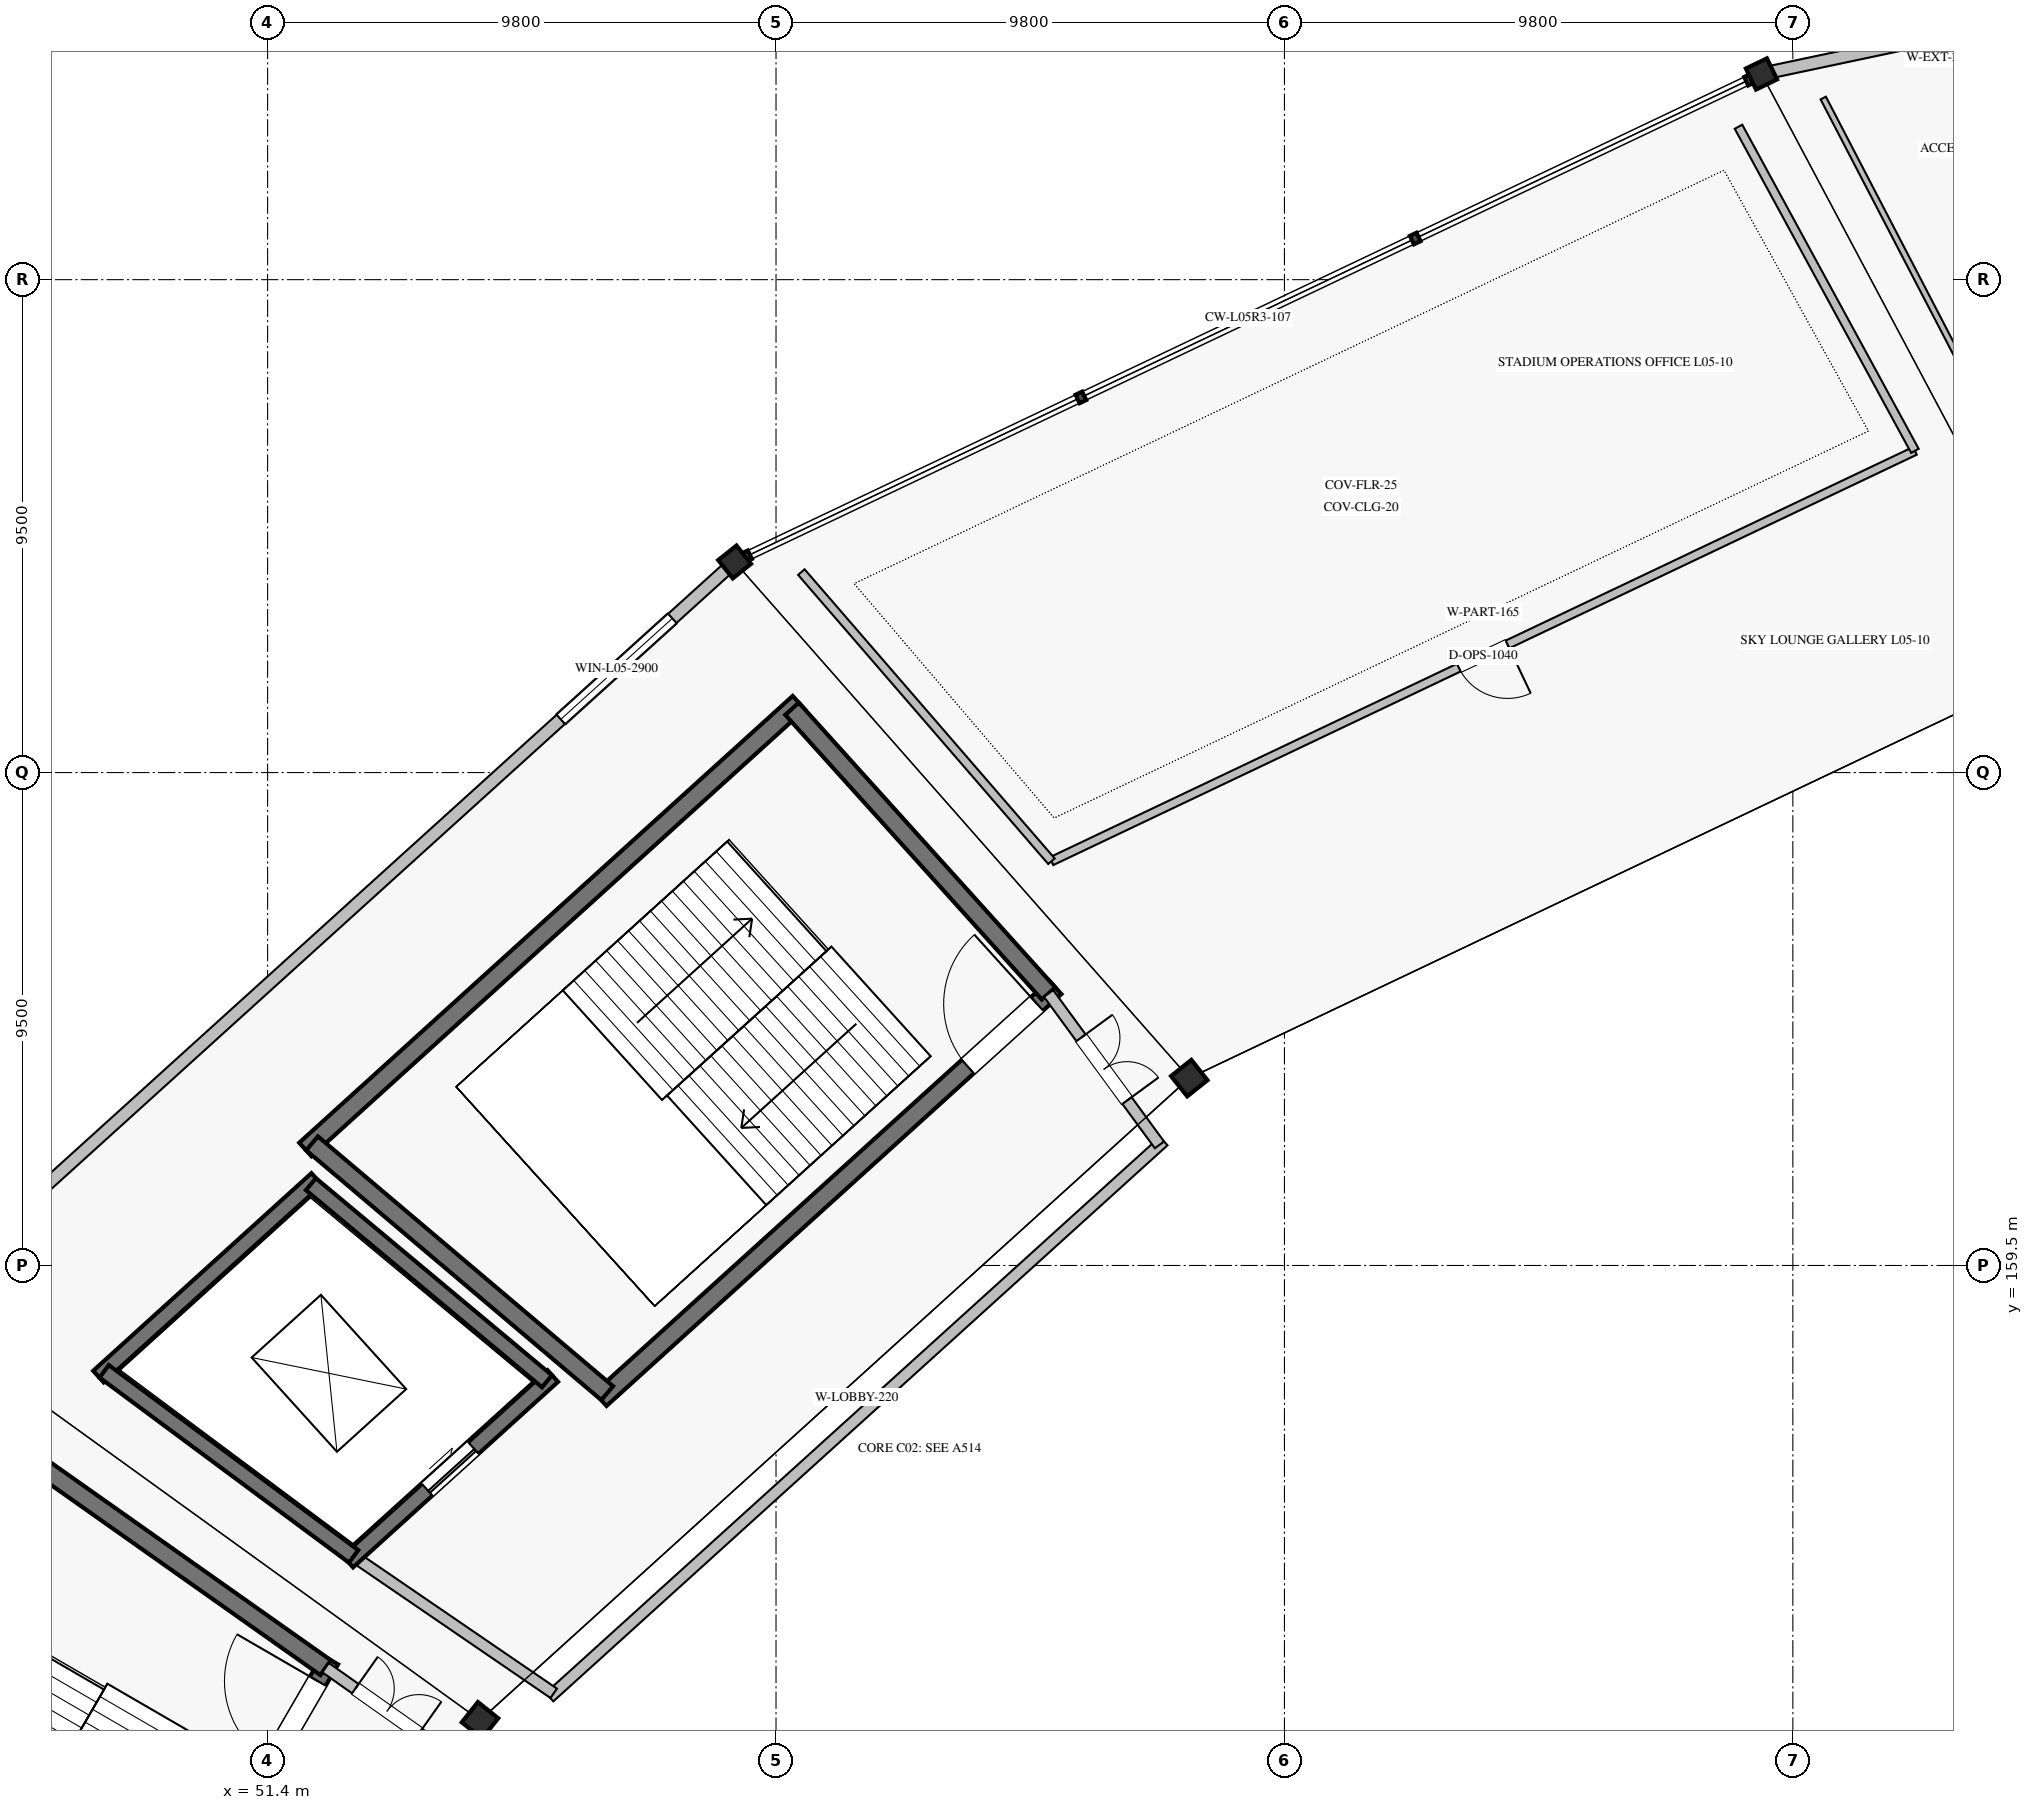
"""IFC4 building model, lengths in metres.
Left out: names, types, materials, properties, quantities, classifications, styles, units other than length and angle.
Written with IfcOpenShell. Run it as: python <this file> out.ifc"""

import sys

from ifc_helpers import new_model, si_unit, direction, frame, frame_2d, origin, origin_2d, place, context, subcontext, project, spatial, rectangle, hollow_rectangle, extrude, element, fill, save


model = new_model("IFC4")
c1 = context("Model", 3, precision=1e-05, world=origin(), true_north=direction((0.0, 1.0)))
c2 = subcontext(c1, "Body", "Model", "MODEL_VIEW")
j1 = project(units=[si_unit("LENGTHUNIT", "METRE"), si_unit("PLANEANGLEUNIT", "RADIAN")], contexts=[c1])
p1 = place(None, origin())
s1 = spatial("IfcSite", under=j1, at=p1, CompositionType="ELEMENT")
p2 = place(p1, origin())
s2 = spatial("IfcBuilding", under=s1, at=p2, CompositionType="ELEMENT")
p3 = place(p2, frame((0.0, 0.0, 25.84)))
s3 = spatial("IfcBuildingStorey", under=s2, at=p3, CompositionType="ELEMENT", Elevation=25.84)
for number, where, z_axis, x_axis in (
    (1, (69.166, 163.111, 0.0), (0.0, 0.0, 1.0), (-0.623, 0.782, 0.0)),
    (2, (55.494, 150.734, 0.0), (0.0, 0.0, 1.0), (-0.782, 0.623, 0.0)),
):
    element("IfcColumn", number, at=place(p3, frame(where, z_axis=z_axis, x_axis=x_axis)), inside=s3, PredefinedType="COLUMN", context=c2, shape_type="SweptSolid", body=[
        extrude(hollow_rectangle(XDim=0.5, YDim=0.5, WallThickness=0.022, at=origin_2d()), origin(), (0.0, 0.0, 1.0), 5.44),
    ])
for number, where, z_axis, x_axis in (
    (3, (80.195, 182.464, 0.0), (0.0, 0.0, 1.0), (-0.434, 0.901, 0.0)),
    (4, (60.402, 173.059, 0.0), (0.0, 0.0, 1.0), (-0.623, 0.782, 0.0)),
):
    element("IfcColumn", number, at=place(p3, frame(where, z_axis=z_axis, x_axis=x_axis)), inside=s3, PredefinedType="COLUMN", context=c2, shape_type="SweptSolid", body=[
        extrude(hollow_rectangle(XDim=0.45, YDim=0.45, WallThickness=0.022, at=origin_2d()), origin(), (0.0, 0.0, 1.0), 5.44),
    ])
p4 = place(p3, frame((101.357, 186.941, 0.0), z_axis=(0.0, 0.0, 1.0), x_axis=(-0.978344108288, -0.206985037572, 0.0)))
e5 = element("IfcWall", 5, at=p4, inside=s3, PredefinedType="SOLIDWALL", context=c2, shape_type="SweptSolid", body=[
    extrude(rectangle(XDim=21.41, YDim=0.24, at=frame_2d((10.705, 0.0))), origin(), (0.0, 0.0, 1.0), 4.53),
])
p5 = place(p4, frame((3.557, 0.0, 1.65)))
e6 = element("IfcOpeningElement", 6, at=p5, cuts=e5, PredefinedType="OPENING", context=c2, shape_type="SweptSolid", body=[
    extrude(rectangle(XDim=1.45, YDim=0.95, at=frame_2d((0.725, 0.475))), frame((0.0, 0.13, 0.0), z_axis=(0.0, -1.0, 0.0), x_axis=(1.0, 0.0, 0.0)), (0.0, 0.0, 1.0), 0.26),
])
p6 = place(p4, frame((10.737, 0.0, 1.65)))
e7 = element("IfcOpeningElement", 7, at=p6, cuts=e5, PredefinedType="OPENING", context=c2, shape_type="SweptSolid", body=[
    extrude(rectangle(XDim=1.65, YDim=1.0, at=frame_2d((0.825, 0.5))), frame((0.0, 0.13, 0.0), z_axis=(0.0, -1.0, 0.0), x_axis=(1.0, 0.0, 0.0)), (0.0, 0.0, 1.0), 0.26),
])
p7 = place(p4, frame((17.385, 0.0, 1.65)))
e8 = element("IfcOpeningElement", 8, at=p7, cuts=e5, PredefinedType="OPENING", context=c2, shape_type="SweptSolid", body=[
    extrude(rectangle(XDim=1.2, YDim=0.9, at=frame_2d((0.6, 0.45))), frame((0.0, 0.13, 0.0), z_axis=(0.0, -1.0, 0.0), x_axis=(1.0, 0.0, 0.0)), (0.0, 0.0, 1.0), 0.26),
])
p8 = place(p3, frame((60.239, 172.911, 0.0), z_axis=(0.0, 0.0, 1.0), x_axis=(-0.741349049196, -0.671119651967, 0.0)))
e9 = element("IfcWall", 9, at=p8, inside=s3, PredefinedType="SOLIDWALL", context=c2, shape_type="SweptSolid", body=[
    extrude(rectangle(XDim=21.004, YDim=0.24, at=frame_2d((10.502, 0.0))), origin(), (0.0, 0.0, 1.0), 4.53),
])
p9 = place(p8, frame((1.4, 0.0, 1.0)))
e10 = element("IfcOpeningElement", 10, at=p9, cuts=e9, PredefinedType="OPENING", context=c2, shape_type="SweptSolid", body=[
    extrude(rectangle(XDim=2.9, YDim=2.05, at=frame_2d((1.45, 1.025))), frame((0.0, 0.13, 0.0), z_axis=(0.0, -1.0, 0.0), x_axis=(1.0, 0.0, 0.0)), (0.0, 0.0, 1.0), 0.26),
])
p10 = place(p3, frame((66.583, 164.86, 0.0), z_axis=(0.0, 0.0, 1.0), x_axis=(-0.741348929385, -0.671119784315, 0.0)))
e11 = element("IfcWall", 11, at=p10, inside=s3, PredefinedType="SHEAR", context=c2, shape_type="SweptSolid", body=[
    extrude(rectangle(XDim=11.826, YDim=0.35, at=frame_2d((5.913, 0.0))), origin(), (0.0, 0.0, 1.0), 5.18),
])
p11 = place(p10, frame((0.475, 0.0, 0.0)))
e12 = element("IfcOpeningElement", 12, at=p11, cuts=e11, PredefinedType="OPENING", context=c2, shape_type="SweptSolid", body=[
    extrude(rectangle(XDim=1.8, YDim=2.2, at=frame_2d((0.9, 1.1))), frame((0.0, 0.185, 0.0), z_axis=(0.0, -1.0, 0.0), x_axis=(1.0, 0.0, 0.0)), (0.0, 0.0, 1.0), 0.37),
])
p12 = place(p3, frame((61.639, 170.347, 0.0), z_axis=(0.0, 0.0, 1.0), x_axis=(-0.741351373721, -0.671117084183, 0.0)))
e13 = element("IfcWall", 13, at=p12, inside=s3, PredefinedType="SHEAR", context=c2, shape_type="SweptSolid", body=[
    extrude(rectangle(XDim=12.83, YDim=0.35, at=frame_2d((6.415, 0.0))), origin(), (0.0, 0.0, 1.0), 5.18),
])
p13 = place(p3, frame((66.454, 164.743, 0.0), z_axis=(0.0, 0.0, 1.0), x_axis=(-0.669463145673, 0.742845270958, 0.0)))
e14 = element("IfcWall", 14, at=p13, inside=s3, PredefinedType="SHEAR", context=c2, shape_type="SweptSolid", body=[
    extrude(rectangle(XDim=7.386, YDim=0.35, at=frame_2d((3.693, 0.0))), origin(), (0.0, 0.0, 1.0), 5.18),
])
p14 = place(p3, frame((57.945, 157.041, 0.0), z_axis=(0.0, 0.0, 1.0), x_axis=(-0.763422324031, 0.64589964791, 0.0)))
e15 = element("IfcWall", 15, at=p14, inside=s3, PredefinedType="SHEAR", context=c2, shape_type="SweptSolid", body=[
    extrude(rectangle(XDim=7.452, YDim=0.35, at=frame_2d((3.726, 0.0))), origin(), (0.0, 0.0, 1.0), 5.18),
])
p15 = place(p3, frame((56.897, 157.369, 0.0), z_axis=(0.0, 0.0, 1.0), x_axis=(-0.741350155641, -0.671118429736, 0.0)))
e16 = element("IfcWall", 16, at=p15, inside=s3, PredefinedType="SHEAR", context=c2, shape_type="SweptSolid", body=[
    extrude(rectangle(XDim=5.329, YDim=0.3, at=frame_2d((2.665, 0.0))), origin(), (0.0, 0.0, 1.0), 5.18),
])
p16 = place(p15, frame((2.065, 0.0, 0.0)))
e17 = element("IfcOpeningElement", 17, at=p16, cuts=e16, PredefinedType="OPENING", context=c2, shape_type="SweptSolid", body=[
    extrude(rectangle(XDim=1.2, YDim=2.2, at=frame_2d((0.6, 1.1))), frame((0.0, 0.16, 0.0), z_axis=(0.0, -1.0, 0.0), x_axis=(1.0, 0.0, 0.0)), (0.0, 0.0, 1.0), 0.32),
])
p17 = place(p3, frame((52.346, 161.168, 0.0), z_axis=(0.0, 0.0, 1.0), x_axis=(-0.74134208775, -0.671127341815, 0.0)))
e18 = element("IfcWall", 18, at=p17, inside=s3, PredefinedType="SHEAR", context=c2, shape_type="SweptSolid", body=[
    extrude(rectangle(XDim=5.675, YDim=0.3, at=frame_2d((2.837, 0.0))), origin(), (0.0, 0.0, 1.0), 5.18),
])
p18 = place(p3, frame((56.786, 157.268, 0.0), z_axis=(0.0, 0.0, 1.0), x_axis=(-0.767711354146, 0.640795815151, 0.0)))
e19 = element("IfcWall", 19, at=p18, inside=s3, PredefinedType="SHEAR", context=c2, shape_type="SweptSolid", body=[
    extrude(rectangle(XDim=5.929, YDim=0.3, at=frame_2d((2.964, 0.0))), origin(), (0.0, 0.0, 1.0), 5.18),
])
p19 = place(p3, frame((53.058, 153.893, 0.0), z_axis=(0.0, 0.0, 1.0), x_axis=(-0.803101805449, 0.59584183311, 0.0)))
e20 = element("IfcWall", 20, at=p19, inside=s3, PredefinedType="SHEAR", context=c2, shape_type="SweptSolid", body=[
    extrude(rectangle(XDim=5.986, YDim=0.3, at=frame_2d((2.993, 0.0))), origin(), (0.0, 0.0, 1.0), 5.18),
])
p20 = place(p3, frame((68.673, 161.898, 0.0), z_axis=(0.0, 0.0, 1.0), x_axis=(-0.741351035574, -0.671117457717, 0.0)))
e21 = element("IfcWall", 21, at=p20, inside=s3, PredefinedType="SOLIDWALL", context=c2, shape_type="SweptSolid", body=[
    extrude(rectangle(XDim=15.969, YDim=0.22, at=frame_2d((7.985, 0.0))), origin(), (0.0, 0.0, 1.0), 5.18),
])
p21 = place(p3, frame((68.591, 161.824, 0.0), z_axis=(0.0, 0.0, 1.0), x_axis=(-0.590836915359, 0.806791013491, 0.0)))
e22 = element("IfcWall", 22, at=p21, inside=s3, PredefinedType="SOLIDWALL", context=c2, shape_type="SweptSolid", body=[
    extrude(rectangle(XDim=3.618, YDim=0.22, at=frame_2d((1.809, 0.0))), origin(), (0.0, 0.0, 1.0), 5.18),
])
p22 = place(p21, frame((1.059, 0.0, 0.0)))
e23 = element("IfcOpeningElement", 23, at=p22, cuts=e22, PredefinedType="OPENING", context=c2, shape_type="SweptSolid", body=[
    extrude(rectangle(XDim=1.5, YDim=2.2, at=frame_2d((0.75, 1.1))), frame((0.0, 0.12, 0.0), z_axis=(0.0, -1.0, 0.0), x_axis=(1.0, 0.0, 0.0)), (0.0, 0.0, 1.0), 0.24),
])
p23 = place(p3, frame((56.915, 151.254, 0.0), z_axis=(0.0, 0.0, 1.0), x_axis=(-0.825385410642, 0.564569680287, 0.0)))
e24 = element("IfcWall", 24, at=p23, inside=s3, PredefinedType="SOLIDWALL", context=c2, shape_type="SweptSolid", body=[
    extrude(rectangle(XDim=4.674, YDim=0.22, at=frame_2d((2.337, 0.0))), origin(), (0.0, 0.0, 1.0), 5.18),
])
p24 = place(p3, frame((52.606, 151.9, 0.0), z_axis=(0.0, 0.0, 1.0), x_axis=(-0.501587404838, -0.865106973332, 0.0)))
e25 = element("IfcWall", 25, at=p24, inside=s3, PredefinedType="SHEAR", context=c2, shape_type="SweptSolid", body=[
    extrude(rectangle(XDim=11.435, YDim=0.35, at=frame_2d((5.718, 0.0))), origin(), (0.0, 0.0, 1.0), 5.18),
])
p25 = place(p24, frame((0.475, 0.0, 0.0)))
e26 = element("IfcOpeningElement", 26, at=p25, cuts=e25, PredefinedType="OPENING", context=c2, shape_type="SweptSolid", body=[
    extrude(rectangle(XDim=1.8, YDim=2.2, at=frame_2d((0.9, 1.1))), frame((0.0, 0.185, 0.0), z_axis=(0.0, -1.0, 0.0), x_axis=(1.0, 0.0, 0.0)), (0.0, 0.0, 1.0), 0.37),
])
p26 = place(p3, frame((52.519, 151.748, 0.0), z_axis=(0.0, 0.0, 1.0), x_axis=(-0.816983109824, 0.576661597701, 0.0)))
e27 = element("IfcWall", 27, at=p26, inside=s3, PredefinedType="SHEAR", context=c2, shape_type="SweptSolid", body=[
    extrude(rectangle(XDim=7.544, YDim=0.35, at=frame_2d((3.772, 0.0))), origin(), (0.0, 0.0, 1.0), 5.18),
])
p27 = place(p3, frame((54.889, 150.075, 0.0), z_axis=(0.0, 0.0, 1.0), x_axis=(-0.816984187086, 0.57666007149, 0.0)))
e28 = element("IfcWall", 28, at=p27, inside=s3, PredefinedType="SOLIDWALL", context=c2, shape_type="SweptSolid", body=[
    extrude(rectangle(XDim=2.901, YDim=0.22, at=frame_2d((1.451, 0.0))), origin(), (0.0, 0.0, 1.0), 5.18),
])
p28 = place(p27, frame((0.701, 0.0, 0.0)))
e29 = element("IfcOpeningElement", 29, at=p28, cuts=e28, PredefinedType="OPENING", context=c2, shape_type="SweptSolid", body=[
    extrude(rectangle(XDim=1.5, YDim=2.2, at=frame_2d((0.75, 1.1))), frame((0.0, 0.12, 0.0), z_axis=(0.0, -1.0, 0.0), x_axis=(1.0, 0.0, 0.0)), (0.0, 0.0, 1.0), 0.24),
])
p29 = place(p3, frame((84.658, 175.71, 0.0), z_axis=(0.0, 0.0, 1.0), x_axis=(-0.461466568794, 0.887157599238, 0.0)))
e30 = element("IfcWall", 30, at=p29, inside=s3, PredefinedType="PARTITIONING", context=c2, shape_type="SweptSolid", body=[
    extrude(rectangle(XDim=7.09, YDim=0.115, at=frame_2d((3.545, 0.0))), origin(), (0.0, 0.0, 1.0), 4.5),
])
p30 = place(p3, frame((83.153, 175.2, 0.0), z_axis=(0.0, 0.0, 1.0), x_axis=(-0.90321677741, -0.429184637429, 0.0)))
e31 = element("IfcWall", 31, at=p30, inside=s3, PredefinedType="PARTITIONING", context=c2, shape_type="SweptSolid", body=[
    extrude(rectangle(XDim=18.427, YDim=0.165, at=frame_2d((9.214, 0.0))), origin(), (0.0, 0.0, 1.0), 4.5),
])
p31 = place(p30, frame((8.694, 0.0, 0.0)))
e32 = element("IfcOpeningElement", 32, at=p31, cuts=e31, PredefinedType="OPENING", context=c2, shape_type="SweptSolid", body=[
    extrude(rectangle(XDim=1.04, YDim=2.15, at=frame_2d((0.52, 1.075))), frame((0.0, 0.093, 0.0), z_axis=(0.0, -1.0, 0.0), x_axis=(1.0, 0.0, 0.0)), (0.0, 0.0, 1.0), 0.185),
])
p32 = place(p3, frame((83.153, 175.2, 0.0), z_axis=(0.0, 0.0, 1.0), x_axis=(-0.47812325427, 0.878292749444, 0.0)))
e33 = element("IfcWall", 33, at=p32, inside=s3, PredefinedType="PARTITIONING", context=c2, shape_type="SweptSolid", body=[
    extrude(rectangle(XDim=7.113, YDim=0.165, at=frame_2d((3.556, 0.0))), origin(), (0.0, 0.0, 1.0), 4.5),
])
p33 = place(p3, frame((66.509, 167.292, 0.0), z_axis=(0.0, 0.0, 1.0), x_axis=(-0.654288201841, 0.7562452968, 0.0)))
e34 = element("IfcWall", 34, at=p33, inside=s3, PredefinedType="PARTITIONING", context=c2, shape_type="SweptSolid", body=[
    extrude(rectangle(XDim=7.368, YDim=0.165, at=frame_2d((3.684, 0.0))), origin(), (0.0, 0.0, 1.0), 4.5),
])
p34 = place(p9, origin())
e35 = element("IfcWindow", 35, at=p34, inside=s3, PartitioningType="SINGLE_PANEL", PredefinedType="WINDOW", context=c2, shape_type="SweptSolid", body=[
    extrude(rectangle(XDim=2.9, YDim=2.05, at=frame_2d((1.45, 1.025))), frame((0.0, 0.03, 0.0), z_axis=(0.0, -1.0, 0.0), x_axis=(1.0, 0.0, 0.0)), (0.0, 0.0, 1.0), 0.06),
])
fill(e10, e35)
p35 = place(p11, frame((1.8, 0.0, 0.0), z_axis=(0.0, 0.0, 1.0), x_axis=(-1.0, 0.0, 0.0)))
e36 = element("IfcDoor", 36, at=p35, inside=s3, OperationType="SINGLE_SWING_RIGHT", PredefinedType="DOOR", context=c2, shape_type="SweptSolid", body=[
    extrude(rectangle(XDim=1.8, YDim=2.2, at=frame_2d((0.9, 1.1))), frame((0.0, 0.025, 0.0), z_axis=(0.0, -1.0, 0.0), x_axis=(1.0, 0.0, 0.0)), (0.0, 0.0, 1.0), 0.05),
])
fill(e12, e36)
p36 = place(p16, origin())
e37 = element("IfcDoor", 37, at=p36, inside=s3, OperationType="SLIDING_TO_LEFT", PredefinedType="DOOR", context=c2, shape_type="SweptSolid", body=[
    extrude(rectangle(XDim=1.2, YDim=2.2, at=frame_2d((0.6, 1.1))), frame((0.0, 0.025, 0.0), z_axis=(0.0, -1.0, 0.0), x_axis=(1.0, 0.0, 0.0)), (0.0, 0.0, 1.0), 0.05),
])
fill(e17, e37)
p37 = place(p22, frame((1.5, 0.0, 0.0), z_axis=(0.0, 0.0, 1.0), x_axis=(-1.0, 0.0, 0.0)))
e38 = element("IfcDoor", 38, at=p37, inside=s3, OperationType="DOUBLE_DOOR_SINGLE_SWING", PredefinedType="DOOR", context=c2, shape_type="SweptSolid", body=[
    extrude(rectangle(XDim=1.5, YDim=2.2, at=frame_2d((0.75, 1.1))), frame((0.0, 0.025, 0.0), z_axis=(0.0, -1.0, 0.0), x_axis=(1.0, 0.0, 0.0)), (0.0, 0.0, 1.0), 0.05),
])
fill(e23, e38)
p38 = place(p25, frame((1.8, 0.0, 0.0), z_axis=(0.0, 0.0, 1.0), x_axis=(-1.0, 0.0, 0.0)))
e39 = element("IfcDoor", 39, at=p38, inside=s3, OperationType="SINGLE_SWING_RIGHT", PredefinedType="DOOR", context=c2, shape_type="SweptSolid", body=[
    extrude(rectangle(XDim=1.8, YDim=2.2, at=frame_2d((0.9, 1.1))), frame((0.0, 0.025, 0.0), z_axis=(0.0, -1.0, 0.0), x_axis=(1.0, 0.0, 0.0)), (0.0, 0.0, 1.0), 0.05),
])
fill(e26, e39)
p39 = place(p28, frame((1.5, 0.0, 0.0), z_axis=(0.0, 0.0, 1.0), x_axis=(-1.0, 0.0, 0.0)))
e40 = element("IfcDoor", 40, at=p39, inside=s3, OperationType="DOUBLE_DOOR_SINGLE_SWING", PredefinedType="DOOR", context=c2, shape_type="SweptSolid", body=[
    extrude(rectangle(XDim=1.5, YDim=2.2, at=frame_2d((0.75, 1.1))), frame((0.0, 0.025, 0.0), z_axis=(0.0, -1.0, 0.0), x_axis=(1.0, 0.0, 0.0)), (0.0, 0.0, 1.0), 0.05),
])
fill(e29, e40)
p40 = place(p31, origin())
e41 = element("IfcDoor", 41, at=p40, inside=s3, OperationType="SINGLE_SWING_LEFT", PredefinedType="DOOR", context=c2, shape_type="SweptSolid", body=[
    extrude(rectangle(XDim=1.04, YDim=2.15, at=frame_2d((0.52, 1.075))), frame((0.0, 0.025, 0.0), z_axis=(0.0, -1.0, 0.0), x_axis=(1.0, 0.0, 0.0)), (0.0, 0.0, 1.0), 0.05),
])
fill(e32, e41)
save(model, sys.argv[1])
